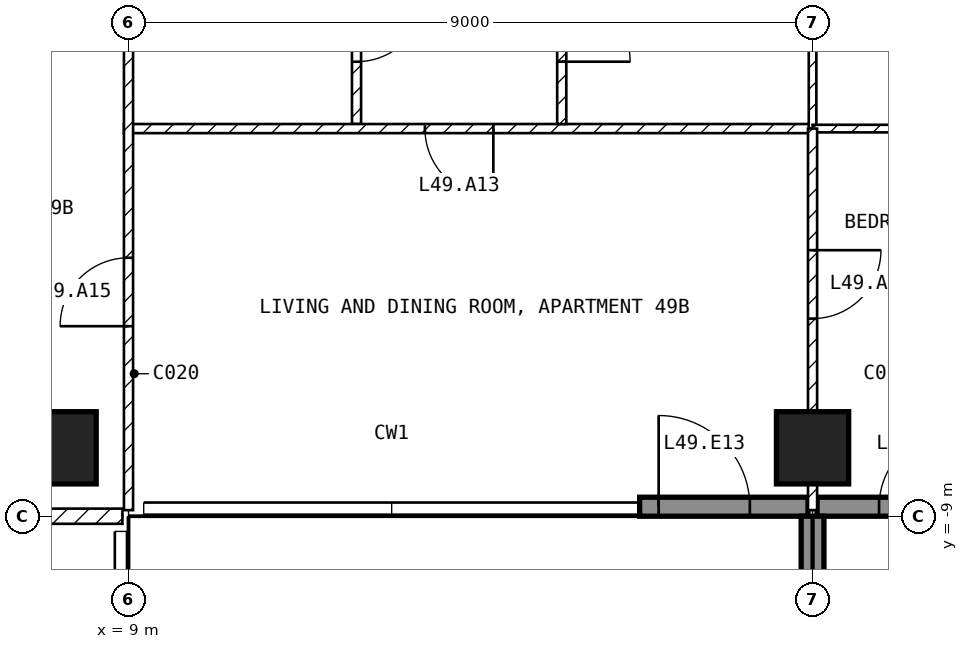
"""IFC4 building model, lengths in metres.
Left out: names, types, materials, properties, quantities, classifications, styles, units other than length and angle.
Written with IfcOpenShell. Run it as: python <this file> out.ifc"""

import sys

from ifc_helpers import new_model, si_unit, direction, frame, frame_2d, origin, origin_2d, place, context, subcontext, project, spatial, rectangle, extrude, element, fill, save


model = new_model("IFC4")
c1 = context("Model", 3, precision=1e-05, world=origin(), true_north=direction((0.0, 1.0)))
c2 = subcontext(c1, "Body", "Model", "MODEL_VIEW")
j1 = project(units=[si_unit("LENGTHUNIT", "METRE"), si_unit("PLANEANGLEUNIT", "RADIAN")], contexts=[c1])
p1 = place(None, origin())
s1 = spatial("IfcSite", under=j1, at=p1, CompositionType="ELEMENT")
p2 = place(p1, origin())
s2 = spatial("IfcBuilding", under=s1, at=p2, CompositionType="ELEMENT")
p3 = place(p2, frame((0.0, 0.0, 198.1)))
s3 = spatial("IfcBuildingStorey", under=s2, at=p3, CompositionType="ELEMENT", Elevation=198.1)
for number, where, z_axis, x_axis in (
    (1, (8.1, -8.1, -0.25), (0.0, 0.0, 1.0), (1.0, 0.0, 0.0)),
    (2, (18.0, -8.1, -0.25), (0.0, 0.0, 1.0), (1.0, 0.0, 0.0)),
):
    element("IfcColumn", number, at=place(p3, frame(where, z_axis=z_axis, x_axis=x_axis)), inside=s3, PredefinedType="COLUMN", context=c2, shape_type="SweptSolid", body=[
        extrude(rectangle(XDim=0.95, YDim=0.95, at=origin_2d()), origin(), (0.0, 0.0, 1.0), 3.5),
    ])
p4 = place(p3, frame((15.725, -8.875, 0.0), z_axis=(0.0, 0.0, 1.0), x_axis=(1.0, 0.0, 0.0)))
e3 = element("IfcWall", 3, at=p4, inside=s3, PredefinedType="SOLIDWALL", context=c2, shape_type="SweptSolid", body=[
    extrude(rectangle(XDim=2.215, YDim=0.25, at=frame_2d((1.107, 0.0))), origin(), (0.0, 0.0, 1.0), 3.25),
])
p5 = place(p4, frame((0.25, 0.0, 0.0)))
e4 = element("IfcOpeningElement", 4, at=p5, cuts=e3, PredefinedType="OPENING", context=c2, shape_type="SweptSolid", body=[
    extrude(rectangle(XDim=1.2, YDim=2.4, at=frame_2d((0.6, 1.2))), frame((0.0, 0.135, 0.0), z_axis=(0.0, -1.0, 0.0), x_axis=(1.0, 0.0, 0.0)), (0.0, 0.0, 1.0), 0.27),
])
p6 = place(p3, frame((18.06, -8.875, 0.0), z_axis=(0.0, 0.0, 1.0), x_axis=(1.0, 0.0, 0.0)))
e5 = element("IfcWall", 5, at=p6, inside=s3, PredefinedType="SOLIDWALL", context=c2, shape_type="SweptSolid", body=[
    extrude(rectangle(XDim=3.115, YDim=0.25, at=frame_2d((1.558, 0.0))), origin(), (0.0, 0.0, 1.0), 3.25),
])
p7 = place(p6, frame((0.815, 0.0, 0.0)))
e6 = element("IfcOpeningElement", 6, at=p7, cuts=e5, PredefinedType="OPENING", context=c2, shape_type="SweptSolid", body=[
    extrude(rectangle(XDim=1.0, YDim=2.4, at=frame_2d((0.5, 1.2))), frame((0.0, 0.135, 0.0), z_axis=(0.0, -1.0, 0.0), x_axis=(1.0, 0.0, 0.0)), (0.0, 0.0, 1.0), 0.27),
])
p8 = place(p3, frame((18.0, -9.0, 0.0), z_axis=(0.0, 0.0, 1.0), x_axis=(0.0, -1.0, 0.0)))
e7 = element("IfcWall", 7, at=p8, inside=s3, PredefinedType="SOLIDWALL", context=c2, shape_type="SweptSolid", body=[
    extrude(rectangle(XDim=2.7, YDim=0.3, at=frame_2d((1.35, 0.0))), origin(), (0.0, 0.0, 1.0), 3.25),
])
p9 = place(p3, frame((8.92, -9.0, 0.0), z_axis=(0.0, 0.0, 1.0), x_axis=(-1.0, 0.0, 0.0)))
e8 = element("IfcWall", 8, at=p9, inside=s3, PredefinedType="PARTITIONING", context=c2, shape_type="SweptSolid", body=[
    extrude(rectangle(XDim=17.84, YDim=0.2, at=frame_2d((8.92, 0.0))), origin(), (0.0, 0.0, 1.0), 3.25),
])
p10 = place(p9, frame((8.42, 0.0, 0.0)))
e9 = element("IfcOpeningElement", 9, at=p10, cuts=e8, PredefinedType="OPENING", context=c2, shape_type="SweptSolid", body=[
    extrude(rectangle(XDim=1.0, YDim=2.1, at=frame_2d((0.5, 1.05))), frame((0.0, 0.11, 0.0), z_axis=(0.0, -1.0, 0.0), x_axis=(1.0, 0.0, 0.0)), (0.0, 0.0, 1.0), 0.22),
])
p11 = place(p3, frame((12.0, -1.3, 0.0), z_axis=(0.0, 0.0, 1.0), x_axis=(0.0, -1.0, 0.0)))
e10 = element("IfcWall", 10, at=p11, inside=s3, PredefinedType="PARTITIONING", context=c2, shape_type="SweptSolid", body=[
    extrude(rectangle(XDim=2.54, YDim=0.12, at=frame_2d((1.27, 0.0))), origin(), (0.0, 0.0, 1.0), 3.25),
])
p12 = place(p11, frame((0.82, 0.0, 0.0)))
e11 = element("IfcOpeningElement", 11, at=p12, cuts=e10, PredefinedType="OPENING", context=c2, shape_type="SweptSolid", body=[
    extrude(rectangle(XDim=0.9, YDim=2.1, at=frame_2d((0.45, 1.05))), frame((0.0, 0.07, 0.0), z_axis=(0.0, -1.0, 0.0), x_axis=(1.0, 0.0, 0.0)), (0.0, 0.0, 1.0), 0.14),
])
p13 = place(p3, frame((18.0, -3.9, 0.0), z_axis=(0.0, 0.0, 1.0), x_axis=(-1.0, 0.0, 0.0)))
e12 = element("IfcWall", 12, at=p13, inside=s3, PredefinedType="PARTITIONING", context=c2, shape_type="SweptSolid", body=[
    extrude(rectangle(XDim=9.06, YDim=0.12, at=frame_2d((4.53, 0.0))), origin(), (0.0, 0.0, 1.0), 3.25),
])
p14 = place(p13, frame((4.2, 0.0, 0.0)))
e13 = element("IfcOpeningElement", 13, at=p14, cuts=e12, PredefinedType="OPENING", context=c2, shape_type="SweptSolid", body=[
    extrude(rectangle(XDim=0.9, YDim=2.1, at=frame_2d((0.45, 1.05))), frame((0.0, 0.07, 0.0), z_axis=(0.0, -1.0, 0.0), x_axis=(1.0, 0.0, 0.0)), (0.0, 0.0, 1.0), 0.14),
])
p15 = place(p3, frame((9.0, -8.92, 0.0), z_axis=(0.0, 0.0, 1.0), x_axis=(0.0, 1.0, 0.0)))
e14 = element("IfcWall", 14, at=p15, inside=s3, PredefinedType="PARTITIONING", context=c2, shape_type="SweptSolid", body=[
    extrude(rectangle(XDim=7.62, YDim=0.12, at=frame_2d((3.81, 0.0))), origin(), (0.0, 0.0, 1.0), 3.25),
])
p16 = place(p15, frame((2.42, 0.0, 0.0)))
e15 = element("IfcOpeningElement", 15, at=p16, cuts=e14, PredefinedType="OPENING", context=c2, shape_type="SweptSolid", body=[
    extrude(rectangle(XDim=0.9, YDim=2.1, at=frame_2d((0.45, 1.05))), frame((0.0, 0.07, 0.0), z_axis=(0.0, -1.0, 0.0), x_axis=(1.0, 0.0, 0.0)), (0.0, 0.0, 1.0), 0.14),
])
p17 = place(p3, frame((14.7, -1.3, 0.0), z_axis=(0.0, 0.0, 1.0), x_axis=(0.0, -1.0, 0.0)))
e16 = element("IfcWall", 16, at=p17, inside=s3, PredefinedType="PARTITIONING", context=c2, shape_type="SweptSolid", body=[
    extrude(rectangle(XDim=2.54, YDim=0.12, at=frame_2d((1.27, 0.0))), origin(), (0.0, 0.0, 1.0), 3.25),
])
p18 = place(p17, frame((0.82, 0.0, 0.0)))
e17 = element("IfcOpeningElement", 17, at=p18, cuts=e16, PredefinedType="OPENING", context=c2, shape_type="SweptSolid", body=[
    extrude(rectangle(XDim=0.9, YDim=2.1, at=frame_2d((0.45, 1.05))), frame((0.0, 0.07, 0.0), z_axis=(0.0, -1.0, 0.0), x_axis=(1.0, 0.0, 0.0)), (0.0, 0.0, 1.0), 0.14),
])
p19 = place(p3, frame((18.0, -1.3, 0.0), z_axis=(0.0, 0.0, 1.0), x_axis=(0.0, -1.0, 0.0)))
e18 = element("IfcWall", 18, at=p19, inside=s3, PredefinedType="PARTITIONING", context=c2, shape_type="SweptSolid", body=[
    extrude(rectangle(XDim=2.6, YDim=0.1, at=frame_2d((1.3, 0.0))), origin(), (0.0, 0.0, 1.0), 2.48),
])
p20 = place(p3, frame((21.6, -3.9, 0.0), z_axis=(0.0, 0.0, 1.0), x_axis=(-1.0, 0.0, 0.0)))
e19 = element("IfcWall", 19, at=p20, inside=s3, PredefinedType="PARTITIONING", context=c2, shape_type="SweptSolid", body=[
    extrude(rectangle(XDim=3.6, YDim=0.1, at=frame_2d((1.8, 0.0))), origin(), (0.0, 0.0, 1.0), 3.25),
])
p21 = place(p20, frame((1.375, 0.0, 0.0)))
e20 = element("IfcOpeningElement", 20, at=p21, cuts=e19, PredefinedType="OPENING", context=c2, shape_type="SweptSolid", body=[
    extrude(rectangle(XDim=0.85, YDim=2.1, at=frame_2d((0.425, 1.05))), frame((0.0, 0.06, 0.0), z_axis=(0.0, -1.0, 0.0), x_axis=(1.0, 0.0, 0.0)), (0.0, 0.0, 1.0), 0.12),
])
p22 = place(p3, frame((18.0, -3.9, 0.0), z_axis=(0.0, 0.0, 1.0), x_axis=(0.0, -1.0, 0.0)))
e21 = element("IfcWall", 21, at=p22, inside=s3, PredefinedType="PARTITIONING", context=c2, shape_type="SweptSolid", body=[
    extrude(rectangle(XDim=5.02, YDim=0.12, at=frame_2d((2.51, 0.0))), origin(), (0.0, 0.0, 1.0), 2.48),
])
p23 = place(p22, frame((1.6, 0.0, 0.0)))
e22 = element("IfcOpeningElement", 22, at=p23, cuts=e21, PredefinedType="OPENING", context=c2, shape_type="SweptSolid", body=[
    extrude(rectangle(XDim=0.9, YDim=2.1, at=frame_2d((0.45, 1.05))), frame((0.0, 0.07, 0.0), z_axis=(0.0, -1.0, 0.0), x_axis=(1.0, 0.0, 0.0)), (0.0, 0.0, 1.0), 0.14),
])
p24 = place(p5, origin())
e23 = element("IfcDoor", 23, at=p24, inside=s3, OperationType="SINGLE_SWING_LEFT", PredefinedType="DOOR", context=c2, shape_type="SweptSolid", body=[
    extrude(rectangle(XDim=1.2, YDim=2.4, at=frame_2d((0.6, 1.2))), frame((0.0, 0.025, 0.0), z_axis=(0.0, -1.0, 0.0), x_axis=(1.0, 0.0, 0.0)), (0.0, 0.0, 1.0), 0.05),
])
fill(e4, e23)
p25 = place(p7, origin())
e24 = element("IfcDoor", 24, at=p25, inside=s3, OperationType="SINGLE_SWING_RIGHT", PredefinedType="DOOR", context=c2, shape_type="SweptSolid", body=[
    extrude(rectangle(XDim=1.0, YDim=2.4, at=frame_2d((0.5, 1.2))), frame((0.0, 0.025, 0.0), z_axis=(0.0, -1.0, 0.0), x_axis=(1.0, 0.0, 0.0)), (0.0, 0.0, 1.0), 0.05),
])
fill(e6, e24)
p26 = place(p23, origin())
e25 = element("IfcDoor", 25, at=p26, inside=s3, OperationType="SINGLE_SWING_LEFT", PredefinedType="DOOR", context=c2, shape_type="SweptSolid", body=[
    extrude(rectangle(XDim=0.9, YDim=2.1, at=frame_2d((0.45, 1.05))), frame((0.0, 0.025, 0.0), z_axis=(0.0, -1.0, 0.0), x_axis=(1.0, 0.0, 0.0)), (0.0, 0.0, 1.0), 0.05),
])
fill(e22, e25)
p27 = place(p12, origin())
e26 = element("IfcDoor", 26, at=p27, inside=s3, OperationType="SINGLE_SWING_LEFT", PredefinedType="DOOR", context=c2, shape_type="SweptSolid", body=[
    extrude(rectangle(XDim=0.9, YDim=2.1, at=frame_2d((0.45, 1.05))), frame((0.0, 0.025, 0.0), z_axis=(0.0, -1.0, 0.0), x_axis=(1.0, 0.0, 0.0)), (0.0, 0.0, 1.0), 0.05),
])
fill(e11, e26)
p28 = place(p14, origin())
e27 = element("IfcDoor", 27, at=p28, inside=s3, OperationType="SINGLE_SWING_LEFT", PredefinedType="DOOR", context=c2, shape_type="SweptSolid", body=[
    extrude(rectangle(XDim=0.9, YDim=2.1, at=frame_2d((0.45, 1.05))), frame((0.0, 0.025, 0.0), z_axis=(0.0, -1.0, 0.0), x_axis=(1.0, 0.0, 0.0)), (0.0, 0.0, 1.0), 0.05),
])
fill(e13, e27)
p29 = place(p18, origin())
e28 = element("IfcDoor", 28, at=p29, inside=s3, OperationType="SINGLE_SWING_RIGHT", PredefinedType="DOOR", context=c2, shape_type="SweptSolid", body=[
    extrude(rectangle(XDim=0.9, YDim=2.1, at=frame_2d((0.45, 1.05))), frame((0.0, 0.025, 0.0), z_axis=(0.0, -1.0, 0.0), x_axis=(1.0, 0.0, 0.0)), (0.0, 0.0, 1.0), 0.05),
])
fill(e17, e28)
p30 = place(p16, origin())
e29 = element("IfcDoor", 29, at=p30, inside=s3, OperationType="SINGLE_SWING_LEFT", PredefinedType="DOOR", context=c2, shape_type="SweptSolid", body=[
    extrude(rectangle(XDim=0.9, YDim=2.1, at=frame_2d((0.45, 1.05))), frame((0.0, 0.025, 0.0), z_axis=(0.0, -1.0, 0.0), x_axis=(1.0, 0.0, 0.0)), (0.0, 0.0, 1.0), 0.05),
])
fill(e15, e29)
save(model, sys.argv[1])
